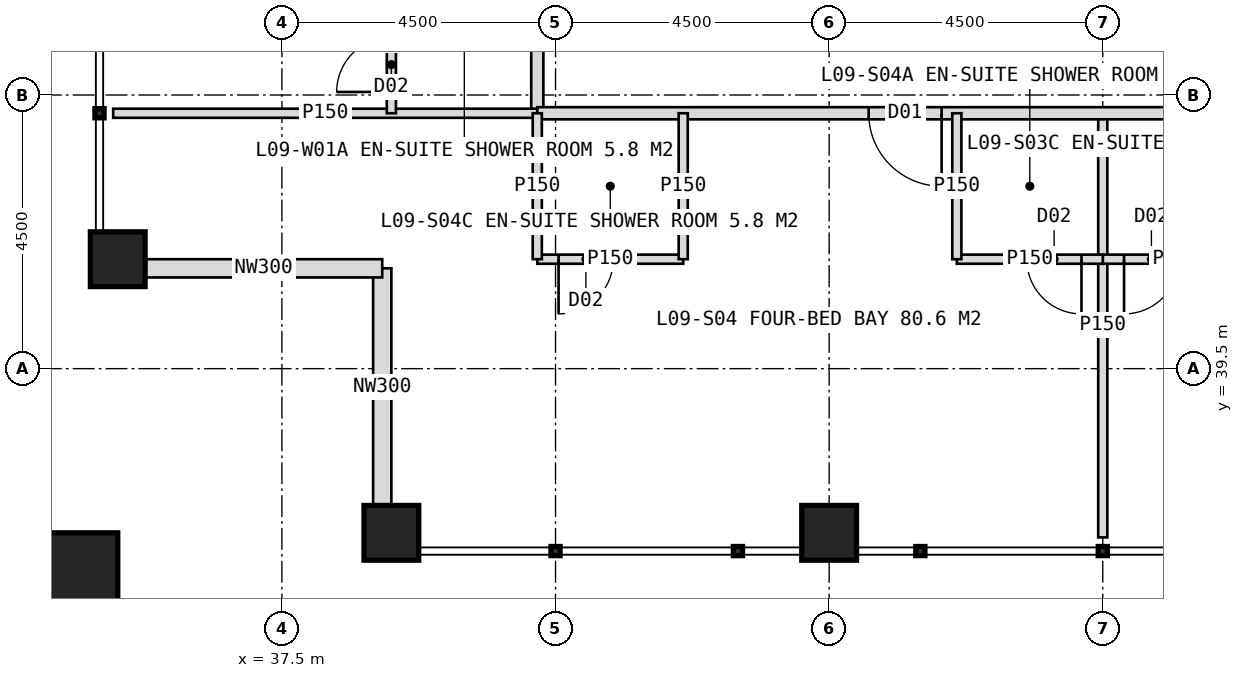
"""IFC4 building model, lengths in metres.
Left out: names, types, materials, properties, quantities, classifications, styles, units other than length and angle.
Written with IfcOpenShell. Run it as: python <this file> out.ifc"""

import sys

from ifc_helpers import new_model, si_unit, direction, frame, frame_2d, origin, origin_2d, place, context, subcontext, project, spatial, rectangle, hollow_rectangle, extrude, element, fill, save


model = new_model("IFC4")
c1 = context("Model", 3, precision=1e-05, world=origin(), true_north=direction((0.0, 1.0)))
c2 = subcontext(c1, "Body", "Model", "MODEL_VIEW")
j1 = project(units=[si_unit("LENGTHUNIT", "METRE"), si_unit("PLANEANGLEUNIT", "RADIAN")], contexts=[c1])
p1 = place(None, origin())
s1 = spatial("IfcSite", under=j1, at=p1, CompositionType="ELEMENT")
p2 = place(p1, origin())
s2 = spatial("IfcBuilding", under=s1, at=p2, CompositionType="ELEMENT")
p3 = place(p2, frame((0.0, 0.0, 43.0)))
s3 = spatial("IfcBuildingStorey", under=s2, at=p3, CompositionType="ELEMENT", Elevation=43.0)
for number, where, z_axis, x_axis in (
    (1, (39.3, 36.8, 0.0), (0.0, 0.0, 1.0), (1.0, 0.0, 0.0)),
    (2, (34.8, 41.3, 0.0), (0.0, 0.0, 1.0), (1.0, 0.0, 0.0)),
    (3, (46.5, 36.8, 0.0), (0.0, 0.0, 1.0), (1.0, 0.0, 0.0)),
):
    element("IfcColumn", number, at=place(p3, frame(where, z_axis=z_axis, x_axis=x_axis)), inside=s3, PredefinedType="COLUMN", context=c2, shape_type="SweptSolid", body=[
        extrude(hollow_rectangle(XDim=0.9, YDim=0.9, WallThickness=0.08, at=origin_2d()), origin(), (0.0, 0.0, 1.0), 4.0),
    ])
p4 = place(p3, frame((33.9, 35.9, 0.0), z_axis=(0.0, 0.0, 1.0), x_axis=(1.0, 0.0, 0.0)))
e4 = element("IfcColumn", 4, at=p4, inside=s3, PredefinedType="COLUMN", context=c2, shape_type="SweptSolid", body=[
    extrude(hollow_rectangle(XDim=1.8, YDim=1.8, WallThickness=0.1, at=origin_2d()), origin(), (0.0, 0.0, 1.0), 4.0),
])
for number, where, z_axis, x_axis in (
    (5, (39.15, 37.25, 0.0), (0.0, 0.0, 1.0), (0.0, 1.0, 0.0)),
    (6, (39.15, 41.15, 0.0), (0.0, 0.0, 1.0), (-1.0, 0.0, 0.0)),
):
    element("IfcWall", number, at=place(p3, frame(where, z_axis=z_axis, x_axis=x_axis)), inside=s3, PredefinedType="ELEMENTEDWALL", context=c2, shape_type="SweptSolid", body=[
        extrude(rectangle(XDim=3.9, YDim=0.3, at=frame_2d((1.95, 0.0))), origin(), (0.0, 0.0, 1.0), 2.95),
    ])
p5 = place(p3, frame((41.7, 43.7, 0.0), z_axis=(0.0, 0.0, 1.0), x_axis=(0.0, 1.0, 0.0)))
e7 = element("IfcWall", 7, at=p5, inside=s3, PredefinedType="PARTITIONING", context=c2, shape_type="SweptSolid", body=[
    extrude(rectangle(XDim=36.6, YDim=0.2, at=frame_2d((18.3, 0.0))), origin(), (0.0, 0.0, 1.0), 3.75),
])
p6 = place(p5, frame((2.65, 0.0, 0.0)))
e8 = element("IfcOpeningElement", 8, at=p6, cuts=e7, PredefinedType="OPENING", context=c2, shape_type="SweptSolid", body=[
    extrude(rectangle(XDim=1.2, YDim=2.2, at=frame_2d((0.6, 1.1))), frame((0.0, 0.11, 0.0), z_axis=(0.0, -1.0, 0.0), x_axis=(1.0, 0.0, 0.0)), (0.0, 0.0, 1.0), 0.22),
])
p7 = place(p5, frame((8.95, 0.0, 0.0)))
e9 = element("IfcOpeningElement", 9, at=p7, cuts=e7, PredefinedType="OPENING", context=c2, shape_type="SweptSolid", body=[
    extrude(rectangle(XDim=1.2, YDim=2.2, at=frame_2d((0.6, 1.1))), frame((0.0, 0.11, 0.0), z_axis=(0.0, -1.0, 0.0), x_axis=(1.0, 0.0, 0.0)), (0.0, 0.0, 1.0), 0.22),
])
p8 = place(p5, frame((14.95, 0.0, 0.0)))
e10 = element("IfcOpeningElement", 10, at=p8, cuts=e7, PredefinedType="OPENING", context=c2, shape_type="SweptSolid", body=[
    extrude(rectangle(XDim=1.2, YDim=2.2, at=frame_2d((0.6, 1.1))), frame((0.0, 0.11, 0.0), z_axis=(0.0, -1.0, 0.0), x_axis=(1.0, 0.0, 0.0)), (0.0, 0.0, 1.0), 0.22),
])
p9 = place(p5, frame((20.95, 0.0, 0.0)))
e11 = element("IfcOpeningElement", 11, at=p9, cuts=e7, PredefinedType="OPENING", context=c2, shape_type="SweptSolid", body=[
    extrude(rectangle(XDim=1.2, YDim=2.2, at=frame_2d((0.6, 1.1))), frame((0.0, 0.11, 0.0), z_axis=(0.0, -1.0, 0.0), x_axis=(1.0, 0.0, 0.0)), (0.0, 0.0, 1.0), 0.22),
])
p10 = place(p5, frame((29.95, 0.0, 0.0)))
e12 = element("IfcOpeningElement", 12, at=p10, cuts=e7, PredefinedType="OPENING", context=c2, shape_type="SweptSolid", body=[
    extrude(rectangle(XDim=1.2, YDim=2.2, at=frame_2d((0.6, 1.1))), frame((0.0, 0.11, 0.0), z_axis=(0.0, -1.0, 0.0), x_axis=(1.0, 0.0, 0.0)), (0.0, 0.0, 1.0), 0.22),
])
p11 = place(p3, frame((41.7, 43.7, 0.0), z_axis=(0.0, 0.0, 1.0), x_axis=(-1.0, 0.0, 0.0)))
e13 = element("IfcWall", 13, at=p11, inside=s3, PredefinedType="PARTITIONING", context=c2, shape_type="SweptSolid", body=[
    extrude(rectangle(XDim=6.975, YDim=0.15, at=frame_2d((3.487, 0.0))), origin(), (0.0, 0.0, 1.0), 3.75),
])
p12 = place(p3, frame((39.3, 43.7, 0.0), z_axis=(0.0, 0.0, 1.0), x_axis=(0.0, 1.0, 0.0)))
e14 = element("IfcWall", 14, at=p12, inside=s3, PredefinedType="PARTITIONING", context=c2, shape_type="SweptSolid", body=[
    extrude(rectangle(XDim=2.4, YDim=0.15, at=frame_2d((1.2, 0.0))), origin(), (0.0, 0.0, 1.0), 2.95),
])
p13 = place(p12, frame((0.35, 0.0, 0.0)))
e15 = element("IfcOpeningElement", 15, at=p13, cuts=e14, PredefinedType="OPENING", context=c2, shape_type="SweptSolid", body=[
    extrude(rectangle(XDim=0.9, YDim=2.1, at=frame_2d((0.45, 1.05))), frame((0.0, 0.085, 0.0), z_axis=(0.0, -1.0, 0.0), x_axis=(1.0, 0.0, 0.0)), (0.0, 0.0, 1.0), 0.17),
])
p14 = place(p3, frame((51.0, 43.7, 0.0), z_axis=(0.0, 0.0, 1.0), x_axis=(0.0, -1.0, 0.0)))
e16 = element("IfcWall", 16, at=p14, inside=s3, PredefinedType="PARTITIONING", context=c2, shape_type="SweptSolid", body=[
    extrude(rectangle(XDim=6.975, YDim=0.15, at=frame_2d((3.487, 0.0))), origin(), (0.0, 0.0, 1.0), 3.75),
])
p15 = place(p3, frame((78.3, 43.7, 0.0), z_axis=(0.0, 0.0, 1.0), x_axis=(-1.0, 0.0, 0.0)))
e17 = element("IfcWall", 17, at=p15, inside=s3, PredefinedType="PARTITIONING", context=c2, shape_type="SweptSolid", body=[
    extrude(rectangle(XDim=36.6, YDim=0.2, at=frame_2d((18.3, 0.0))), origin(), (0.0, 0.0, 1.0), 3.75),
])
p16 = place(p15, frame((2.65, 0.0, 0.0)))
e18 = element("IfcOpeningElement", 18, at=p16, cuts=e17, PredefinedType="OPENING", context=c2, shape_type="SweptSolid", body=[
    extrude(rectangle(XDim=1.2, YDim=2.2, at=frame_2d((0.6, 1.1))), frame((0.0, 0.11, 0.0), z_axis=(0.0, -1.0, 0.0), x_axis=(1.0, 0.0, 0.0)), (0.0, 0.0, 1.0), 0.22),
])
p17 = place(p15, frame((11.95, 0.0, 0.0)))
e19 = element("IfcOpeningElement", 19, at=p17, cuts=e17, PredefinedType="OPENING", context=c2, shape_type="SweptSolid", body=[
    extrude(rectangle(XDim=1.2, YDim=2.2, at=frame_2d((0.6, 1.1))), frame((0.0, 0.11, 0.0), z_axis=(0.0, -1.0, 0.0), x_axis=(1.0, 0.0, 0.0)), (0.0, 0.0, 1.0), 0.22),
])
p18 = place(p15, frame((20.95, 0.0, 0.0)))
e20 = element("IfcOpeningElement", 20, at=p18, cuts=e17, PredefinedType="OPENING", context=c2, shape_type="SweptSolid", body=[
    extrude(rectangle(XDim=1.2, YDim=2.2, at=frame_2d((0.6, 1.1))), frame((0.0, 0.11, 0.0), z_axis=(0.0, -1.0, 0.0), x_axis=(1.0, 0.0, 0.0)), (0.0, 0.0, 1.0), 0.22),
])
p19 = place(p15, frame((29.95, 0.0, 0.0)))
e21 = element("IfcOpeningElement", 21, at=p19, cuts=e17, PredefinedType="OPENING", context=c2, shape_type="SweptSolid", body=[
    extrude(rectangle(XDim=1.2, YDim=2.2, at=frame_2d((0.6, 1.1))), frame((0.0, 0.11, 0.0), z_axis=(0.0, -1.0, 0.0), x_axis=(1.0, 0.0, 0.0)), (0.0, 0.0, 1.0), 0.22),
])
p20 = place(p3, frame((53.4, 41.3, 0.0), z_axis=(0.0, 0.0, 1.0), x_axis=(-1.0, 0.0, 0.0)))
e22 = element("IfcWall", 22, at=p20, inside=s3, PredefinedType="PARTITIONING", context=c2, shape_type="SweptSolid", body=[
    extrude(rectangle(XDim=2.4, YDim=0.15, at=frame_2d((1.2, 0.0))), origin(), (0.0, 0.0, 1.0), 3.75),
])
p21 = place(p20, frame((1.15, 0.0, 0.0)))
e23 = element("IfcOpeningElement", 23, at=p21, cuts=e22, PredefinedType="OPENING", context=c2, shape_type="SweptSolid", body=[
    extrude(rectangle(XDim=0.9, YDim=2.1, at=frame_2d((0.45, 1.05))), frame((0.0, 0.085, 0.0), z_axis=(0.0, -1.0, 0.0), x_axis=(1.0, 0.0, 0.0)), (0.0, 0.0, 1.0), 0.17),
])
p22 = place(p3, frame((51.0, 41.3, 0.0), z_axis=(0.0, 0.0, 1.0), x_axis=(-1.0, 0.0, 0.0)))
e24 = element("IfcWall", 24, at=p22, inside=s3, PredefinedType="PARTITIONING", context=c2, shape_type="SweptSolid", body=[
    extrude(rectangle(XDim=2.4, YDim=0.15, at=frame_2d((1.2, 0.0))), origin(), (0.0, 0.0, 1.0), 3.75),
])
p23 = place(p22, frame((0.35, 0.0, 0.0)))
e25 = element("IfcOpeningElement", 25, at=p23, cuts=e24, PredefinedType="OPENING", context=c2, shape_type="SweptSolid", body=[
    extrude(rectangle(XDim=0.9, YDim=2.1, at=frame_2d((0.45, 1.05))), frame((0.0, 0.085, 0.0), z_axis=(0.0, -1.0, 0.0), x_axis=(1.0, 0.0, 0.0)), (0.0, 0.0, 1.0), 0.17),
])
p24 = place(p3, frame((48.6, 43.7, 0.0), z_axis=(0.0, 0.0, 1.0), x_axis=(0.0, -1.0, 0.0)))
e26 = element("IfcWall", 26, at=p24, inside=s3, PredefinedType="PARTITIONING", context=c2, shape_type="SweptSolid", body=[
    extrude(rectangle(XDim=2.4, YDim=0.15, at=frame_2d((1.2, 0.0))), origin(), (0.0, 0.0, 1.0), 3.75),
])
p25 = place(p3, frame((44.1, 41.3, 0.0), z_axis=(0.0, 0.0, 1.0), x_axis=(-1.0, 0.0, 0.0)))
e27 = element("IfcWall", 27, at=p25, inside=s3, PredefinedType="PARTITIONING", context=c2, shape_type="SweptSolid", body=[
    extrude(rectangle(XDim=2.4, YDim=0.15, at=frame_2d((1.2, 0.0))), origin(), (0.0, 0.0, 1.0), 2.95),
])
p26 = place(p25, frame((1.15, 0.0, 0.0)))
e28 = element("IfcOpeningElement", 28, at=p26, cuts=e27, PredefinedType="OPENING", context=c2, shape_type="SweptSolid", body=[
    extrude(rectangle(XDim=0.9, YDim=2.1, at=frame_2d((0.45, 1.05))), frame((0.0, 0.085, 0.0), z_axis=(0.0, -1.0, 0.0), x_axis=(1.0, 0.0, 0.0)), (0.0, 0.0, 1.0), 0.17),
])
for number, where, z_axis, x_axis in (
    (29, (44.1, 43.7, 0.0), (0.0, 0.0, 1.0), (0.0, -1.0, 0.0)),
    (30, (41.7, 43.7, 0.0), (0.0, 0.0, 1.0), (0.0, -1.0, 0.0)),
):
    element("IfcWall", number, at=place(p3, frame(where, z_axis=z_axis, x_axis=x_axis)), inside=s3, PredefinedType="PARTITIONING", context=c2, shape_type="SweptSolid", body=[
        extrude(rectangle(XDim=2.4, YDim=0.15, at=frame_2d((1.2, 0.0))), origin(), (0.0, 0.0, 1.0), 3.75),
    ])
p27 = place(p13, origin())
e31 = element("IfcDoor", 31, at=p27, inside=s3, OperationType="SINGLE_SWING_LEFT", PredefinedType="DOOR", context=c2, shape_type="SweptSolid", body=[
    extrude(rectangle(XDim=0.9, YDim=2.1, at=frame_2d((0.45, 1.05))), frame((0.0, 0.025, 0.0), z_axis=(0.0, -1.0, 0.0), x_axis=(1.0, 0.0, 0.0)), (0.0, 0.0, 1.0), 0.05),
])
fill(e15, e31)
p28 = place(p21, origin())
e32 = element("IfcDoor", 32, at=p28, inside=s3, OperationType="SINGLE_SWING_RIGHT", PredefinedType="DOOR", context=c2, shape_type="SweptSolid", body=[
    extrude(rectangle(XDim=0.9, YDim=2.1, at=frame_2d((0.45, 1.05))), frame((0.0, 0.025, 0.0), z_axis=(0.0, -1.0, 0.0), x_axis=(1.0, 0.0, 0.0)), (0.0, 0.0, 1.0), 0.05),
])
fill(e23, e32)
p29 = place(p19, origin())
e33 = element("IfcDoor", 33, at=p29, inside=s3, OperationType="SINGLE_SWING_LEFT", PredefinedType="DOOR", context=c2, shape_type="SweptSolid", body=[
    extrude(rectangle(XDim=1.2, YDim=2.2, at=frame_2d((0.6, 1.1))), frame((0.0, 0.025, 0.0), z_axis=(0.0, -1.0, 0.0), x_axis=(1.0, 0.0, 0.0)), (0.0, 0.0, 1.0), 0.05),
])
fill(e21, e33)
p30 = place(p23, origin())
e34 = element("IfcDoor", 34, at=p30, inside=s3, OperationType="SINGLE_SWING_LEFT", PredefinedType="DOOR", context=c2, shape_type="SweptSolid", body=[
    extrude(rectangle(XDim=0.9, YDim=2.1, at=frame_2d((0.45, 1.05))), frame((0.0, 0.025, 0.0), z_axis=(0.0, -1.0, 0.0), x_axis=(1.0, 0.0, 0.0)), (0.0, 0.0, 1.0), 0.05),
])
fill(e25, e34)
p31 = place(p26, origin())
e35 = element("IfcDoor", 35, at=p31, inside=s3, OperationType="SINGLE_SWING_RIGHT", PredefinedType="DOOR", context=c2, shape_type="SweptSolid", body=[
    extrude(rectangle(XDim=0.9, YDim=2.1, at=frame_2d((0.45, 1.05))), frame((0.0, 0.025, 0.0), z_axis=(0.0, -1.0, 0.0), x_axis=(1.0, 0.0, 0.0)), (0.0, 0.0, 1.0), 0.05),
])
fill(e28, e35)
save(model, sys.argv[1])
